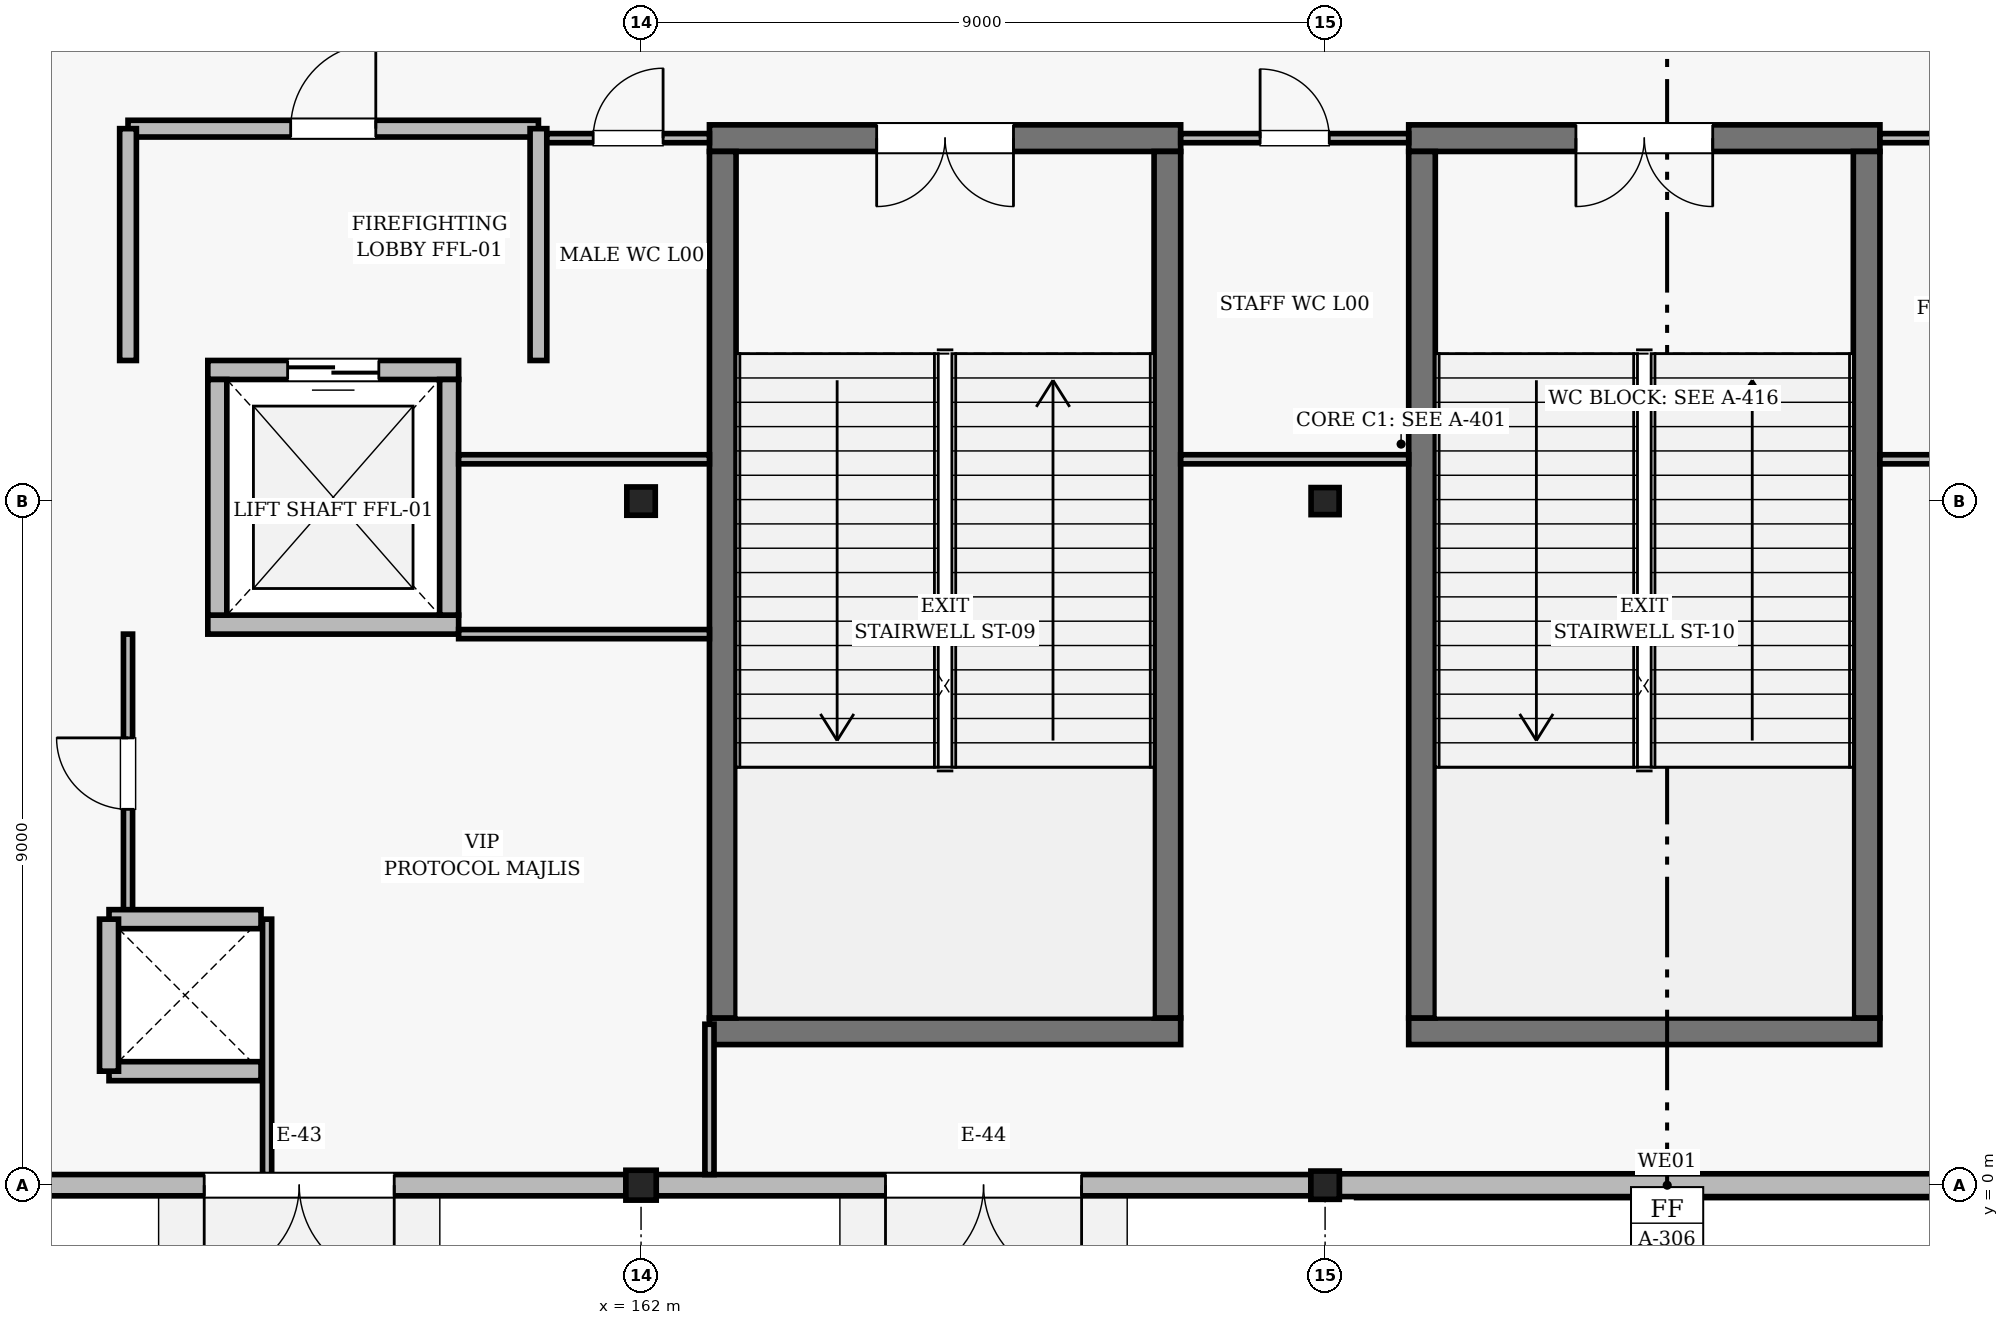
"""IFC4 building model, lengths in metres.
Left out: names, types, materials, properties, quantities, classifications, styles, units other than length and angle.
Written with IfcOpenShell. Run it as: python <this file> out.ifc"""

import sys

from ifc_helpers import new_model, si_unit, direction, frame, frame_2d, origin, origin_2d, place, context, subcontext, project, spatial, rectangle, i_section, extrude, element, fill, save


model = new_model("IFC4")
c1 = context("Model", 3, precision=1e-05, world=origin(), true_north=direction((0.0, 1.0)))
c2 = subcontext(c1, "Body", "Model", "MODEL_VIEW")
j1 = project(units=[si_unit("LENGTHUNIT", "METRE"), si_unit("PLANEANGLEUNIT", "RADIAN")], contexts=[c1])
p1 = place(None, origin())
s1 = spatial("IfcSite", under=j1, at=p1, CompositionType="ELEMENT")
p2 = place(p1, origin())
s2 = spatial("IfcBuilding", under=s1, at=p2, CompositionType="ELEMENT")
p3 = place(p2, origin())
s3 = spatial("IfcBuildingStorey", under=s2, at=p3, CompositionType="ELEMENT", Elevation=0.0)
p4 = place(p3, frame((162.0, 0.0, 0.0), z_axis=(0.0, 0.0, 1.0), x_axis=(1.0, 0.0, 0.0)))
e1 = element("IfcColumn", 1, at=p4, inside=s3, PredefinedType="COLUMN", context=c2, shape_type="SweptSolid", body=[
    extrude(i_section(OverallWidth=0.399, OverallDepth=0.393, WebThickness=0.023, FlangeThickness=0.037, FilletRadius=0.018, at=origin_2d()), origin(), (0.0, 0.0, 1.0), 5.4),
])
for number, where, z_axis, x_axis in (
    (2, (162.0, 9.0, 0.0), (0.0, 0.0, 1.0), (1.0, 0.0, 0.0)),
    (3, (171.0, 0.0, 0.0), (0.0, 0.0, 1.0), (1.0, 0.0, 0.0)),
):
    element("IfcColumn", number, at=place(p3, frame(where, z_axis=z_axis, x_axis=x_axis)), inside=s3, PredefinedType="COLUMN", context=c2, shape_type="SweptSolid", body=[
        extrude(i_section(OverallWidth=0.374, OverallDepth=0.372, WebThickness=0.016, FlangeThickness=0.026, FilletRadius=0.016, at=origin_2d()), origin(), (0.0, 0.0, 1.0), 5.4),
    ])
p5 = place(p3, frame((171.0, 9.0, 0.0), z_axis=(0.0, 0.0, 1.0), x_axis=(1.0, 0.0, 0.0)))
e4 = element("IfcColumn", 4, at=p5, inside=s3, PredefinedType="COLUMN", context=c2, shape_type="SweptSolid", body=[
    extrude(i_section(OverallWidth=0.369, OverallDepth=0.356, WebThickness=0.011, FlangeThickness=0.018, FilletRadius=0.015, at=origin_2d()), origin(), (0.0, 0.0, 1.0), 5.4),
])
p6 = place(p3, frame((161.801, 0.0, 0.0), z_axis=(0.0, 0.0, 1.0), x_axis=(-1.0, 0.0, 0.0)))
e5 = element("IfcWall", 5, at=p6, inside=s3, PredefinedType="SOLIDWALL", context=c2, shape_type="SweptSolid", body=[
    extrude(rectangle(XDim=8.596, YDim=0.28, at=frame_2d((4.298, 0.0))), origin(), (0.0, 0.0, 1.0), 4.699),
])
p7 = place(p6, frame((3.048, 0.0, 0.0)))
e6 = element("IfcOpeningElement", 6, at=p7, cuts=e5, PredefinedType="OPENING", context=c2, shape_type="SweptSolid", body=[
    extrude(rectangle(XDim=2.5, YDim=2.45, at=frame_2d((1.25, 1.225))), frame((0.0, 0.15, 0.0), z_axis=(0.0, -1.0, 0.0), x_axis=(1.0, 0.0, 0.0)), (0.0, 0.0, 1.0), 0.3),
])
p8 = place(p3, frame((170.813, 0.0, 0.0), z_axis=(0.0, 0.0, 1.0), x_axis=(-1.0, 0.0, 0.0)))
e7 = element("IfcWall", 7, at=p8, inside=s3, PredefinedType="SOLIDWALL", context=c2, shape_type="SweptSolid", body=[
    extrude(rectangle(XDim=8.614, YDim=0.28, at=frame_2d((4.307, 0.0))), origin(), (0.0, 0.0, 1.0), 4.865),
])
p9 = place(p8, frame((3.017, 0.0, 0.0)))
e8 = element("IfcOpeningElement", 8, at=p9, cuts=e7, PredefinedType="OPENING", context=c2, shape_type="SweptSolid", body=[
    extrude(rectangle(XDim=2.58, YDim=2.48, at=frame_2d((1.29, 1.24))), frame((0.0, 0.15, 0.0), z_axis=(0.0, -1.0, 0.0), x_axis=(1.0, 0.0, 0.0)), (0.0, 0.0, 1.0), 0.3),
])
p10 = place(p3, frame((179.815, 0.0, 0.0), z_axis=(0.0, 0.0, 1.0), x_axis=(-1.0, 0.0, 0.0)))
e9 = element("IfcWall", 9, at=p10, inside=s3, PredefinedType="SOLIDWALL", context=c2, shape_type="SweptSolid", body=[
    extrude(rectangle(XDim=8.628, YDim=0.3, at=frame_2d((4.314, 0.0))), origin(), (0.0, 0.0, 1.0), 4.626),
])
p11 = place(p3, frame((162.9, 2.025, 0.0), z_axis=(0.0, 0.0, 1.0), x_axis=(1.0, 0.0, 0.0)))
e10 = element("IfcWall", 10, at=p11, inside=s3, PredefinedType="SHEAR", context=c2, shape_type="SweptSolid", body=[
    extrude(rectangle(XDim=6.2, YDim=0.35, at=frame_2d((3.1, 0.0))), origin(), (0.0, 0.0, 1.0), 5.18),
])
p12 = place(p3, frame((169.1, 13.775, 0.0), z_axis=(0.0, 0.0, 1.0), x_axis=(-1.0, 0.0, 0.0)))
e11 = element("IfcWall", 11, at=p12, inside=s3, PredefinedType="SHEAR", context=c2, shape_type="SweptSolid", body=[
    extrude(rectangle(XDim=6.2, YDim=0.35, at=frame_2d((3.1, 0.0))), origin(), (0.0, 0.0, 1.0), 5.18),
])
p13 = place(p12, frame((2.2, 0.0, 0.0)))
e12 = element("IfcOpeningElement", 12, at=p13, cuts=e11, PredefinedType="OPENING", context=c2, shape_type="SweptSolid", body=[
    extrude(rectangle(XDim=1.8, YDim=2.2, at=frame_2d((0.9, 1.1))), frame((0.0, 0.185, 0.0), z_axis=(0.0, -1.0, 0.0), x_axis=(1.0, 0.0, 0.0)), (0.0, 0.0, 1.0), 0.37),
])
for number, where, z_axis, x_axis in (
    (13, (163.075, 13.6, 0.0), (0.0, 0.0, 1.0), (0.0, -1.0, 0.0)),
    (14, (168.925, 2.2, 0.0), (0.0, 0.0, 1.0), (0.0, 1.0, 0.0)),
):
    element("IfcWall", number, at=place(p3, frame(where, z_axis=z_axis, x_axis=x_axis)), inside=s3, PredefinedType="SHEAR", context=c2, shape_type="SweptSolid", body=[
        extrude(rectangle(XDim=11.4, YDim=0.35, at=frame_2d((5.7, 0.0))), origin(), (0.0, 0.0, 1.0), 5.18),
    ])
p14 = place(p3, frame((172.1, 2.025, 0.0), z_axis=(0.0, 0.0, 1.0), x_axis=(1.0, 0.0, 0.0)))
e15 = element("IfcWall", 15, at=p14, inside=s3, PredefinedType="SHEAR", context=c2, shape_type="SweptSolid", body=[
    extrude(rectangle(XDim=6.2, YDim=0.35, at=frame_2d((3.1, 0.0))), origin(), (0.0, 0.0, 1.0), 5.18),
])
p15 = place(p3, frame((178.3, 13.775, 0.0), z_axis=(0.0, 0.0, 1.0), x_axis=(-1.0, 0.0, 0.0)))
e16 = element("IfcWall", 16, at=p15, inside=s3, PredefinedType="SHEAR", context=c2, shape_type="SweptSolid", body=[
    extrude(rectangle(XDim=6.2, YDim=0.35, at=frame_2d((3.1, 0.0))), origin(), (0.0, 0.0, 1.0), 5.18),
])
p16 = place(p15, frame((2.2, 0.0, 0.0)))
e17 = element("IfcOpeningElement", 17, at=p16, cuts=e16, PredefinedType="OPENING", context=c2, shape_type="SweptSolid", body=[
    extrude(rectangle(XDim=1.8, YDim=2.2, at=frame_2d((0.9, 1.1))), frame((0.0, 0.185, 0.0), z_axis=(0.0, -1.0, 0.0), x_axis=(1.0, 0.0, 0.0)), (0.0, 0.0, 1.0), 0.37),
])
for number, where, z_axis, x_axis in (
    (18, (172.275, 13.6, 0.0), (0.0, 0.0, 1.0), (0.0, -1.0, 0.0)),
    (19, (178.125, 2.2, 0.0), (0.0, 0.0, 1.0), (0.0, 1.0, 0.0)),
):
    element("IfcWall", number, at=place(p3, frame(where, z_axis=z_axis, x_axis=x_axis)), inside=s3, PredefinedType="SHEAR", context=c2, shape_type="SweptSolid", body=[
        extrude(rectangle(XDim=11.4, YDim=0.35, at=frame_2d((5.7, 0.0))), origin(), (0.0, 0.0, 1.0), 5.18),
    ])
p17 = place(p3, frame((156.3, 7.375, 0.0), z_axis=(0.0, 0.0, 1.0), x_axis=(1.0, 0.0, 0.0)))
e20 = element("IfcWall", 20, at=p17, inside=s3, PredefinedType="SOLIDWALL", context=c2, shape_type="SweptSolid", body=[
    extrude(rectangle(XDim=3.3, YDim=0.25, at=frame_2d((1.65, 0.0))), origin(), (0.0, 0.0, 1.0), 5.18),
])
p18 = place(p3, frame((159.6, 10.725, 0.0), z_axis=(0.0, 0.0, 1.0), x_axis=(-1.0, 0.0, 0.0)))
e21 = element("IfcWall", 21, at=p18, inside=s3, PredefinedType="SOLIDWALL", context=c2, shape_type="SweptSolid", body=[
    extrude(rectangle(XDim=3.3, YDim=0.25, at=frame_2d((1.65, 0.0))), origin(), (0.0, 0.0, 1.0), 5.18),
])
p19 = place(p18, frame((1.05, 0.0, 0.0)))
e22 = element("IfcOpeningElement", 22, at=p19, cuts=e21, PredefinedType="OPENING", context=c2, shape_type="SweptSolid", body=[
    extrude(rectangle(XDim=1.2, YDim=2.25, at=frame_2d((0.6, 1.125))), frame((0.0, 0.135, 0.0), z_axis=(0.0, -1.0, 0.0), x_axis=(1.0, 0.0, 0.0)), (0.0, 0.0, 1.0), 0.27),
])
for number, where, z_axis, x_axis in (
    (23, (156.425, 10.6, 0.0), (0.0, 0.0, 1.0), (0.0, -1.0, 0.0)),
    (24, (159.475, 7.5, 0.0), (0.0, 0.0, 1.0), (0.0, 1.0, 0.0)),
):
    element("IfcWall", number, at=place(p3, frame(where, z_axis=z_axis, x_axis=x_axis)), inside=s3, PredefinedType="SOLIDWALL", context=c2, shape_type="SweptSolid", body=[
        extrude(rectangle(XDim=3.1, YDim=0.25, at=frame_2d((1.55, 0.0))), origin(), (0.0, 0.0, 1.0), 5.18),
    ])
p20 = place(p3, frame((155.25, 13.9, 0.0), z_axis=(0.0, 0.0, 1.0), x_axis=(1.0, 0.0, 0.0)))
e25 = element("IfcWall", 25, at=p20, inside=s3, PredefinedType="SOLIDWALL", context=c2, shape_type="SweptSolid", body=[
    extrude(rectangle(XDim=5.4, YDim=0.22, at=frame_2d((2.7, 0.0))), origin(), (0.0, 0.0, 1.0), 5.18),
])
p21 = place(p20, frame((2.14, 0.0, 0.0)))
e26 = element("IfcOpeningElement", 26, at=p21, cuts=e25, PredefinedType="OPENING", context=c2, shape_type="SweptSolid", body=[
    extrude(rectangle(XDim=1.12, YDim=2.2, at=frame_2d((0.56, 1.1))), frame((0.0, 0.12, 0.0), z_axis=(0.0, -1.0, 0.0), x_axis=(1.0, 0.0, 0.0)), (0.0, 0.0, 1.0), 0.24),
])
for number, where, z_axis, x_axis in (
    (27, (155.25, 10.85, 0.0), (0.0, 0.0, 1.0), (0.0, 1.0, 0.0)),
    (28, (160.65, 10.85, 0.0), (0.0, 0.0, 1.0), (0.0, 1.0, 0.0)),
):
    element("IfcWall", number, at=place(p3, frame(where, z_axis=z_axis, x_axis=x_axis)), inside=s3, PredefinedType="SOLIDWALL", context=c2, shape_type="SweptSolid", body=[
        extrude(rectangle(XDim=3.05, YDim=0.22, at=frame_2d((1.525, 0.0))), origin(), (0.0, 0.0, 1.0), 5.18),
    ])
p22 = place(p3, frame((160.76, 13.775, 0.0), z_axis=(0.0, 0.0, 1.0), x_axis=(1.0, 0.0, 0.0)))
e29 = element("IfcWall", 29, at=p22, inside=s3, PredefinedType="PARTITIONING", context=c2, shape_type="SweptSolid", body=[
    extrude(rectangle(XDim=2.14, YDim=0.12, at=frame_2d((1.07, 0.0))), origin(), (0.0, 0.0, 1.0), 4.47),
])
p23 = place(p22, frame((0.61, 0.0, 0.0)))
e30 = element("IfcOpeningElement", 30, at=p23, cuts=e29, PredefinedType="OPENING", context=c2, shape_type="SweptSolid", body=[
    extrude(rectangle(XDim=0.92, YDim=2.12, at=frame_2d((0.46, 1.06))), frame((0.0, 0.07, 0.0), z_axis=(0.0, -1.0, 0.0), x_axis=(1.0, 0.0, 0.0)), (0.0, 0.0, 1.0), 0.14),
])
p24 = place(p3, frame((162.9, 9.55, 0.0), z_axis=(0.0, 0.0, 1.0), x_axis=(-1.0, 0.0, 0.0)))
e31 = element("IfcWall", 31, at=p24, inside=s3, PredefinedType="PARTITIONING", context=c2, shape_type="SweptSolid", body=[
    extrude(rectangle(XDim=3.3, YDim=0.12, at=frame_2d((1.65, 0.0))), origin(), (0.0, 0.0, 1.0), 4.47),
])
p25 = place(p3, frame((169.1, 13.775, 0.0), z_axis=(0.0, 0.0, 1.0), x_axis=(1.0, 0.0, 0.0)))
e32 = element("IfcWall", 32, at=p25, inside=s3, PredefinedType="PARTITIONING", context=c2, shape_type="SweptSolid", body=[
    extrude(rectangle(XDim=3.0, YDim=0.12, at=frame_2d((1.5, 0.0))), origin(), (0.0, 0.0, 1.0), 4.554),
])
p26 = place(p25, frame((1.045, 0.0, 0.0)))
e33 = element("IfcOpeningElement", 33, at=p26, cuts=e32, PredefinedType="OPENING", context=c2, shape_type="SweptSolid", body=[
    extrude(rectangle(XDim=0.91, YDim=2.12, at=frame_2d((0.455, 1.06))), frame((0.0, 0.07, 0.0), z_axis=(0.0, -1.0, 0.0), x_axis=(1.0, 0.0, 0.0)), (0.0, 0.0, 1.0), 0.14),
])
p27 = place(p3, frame((172.1, 9.55, 0.0), z_axis=(0.0, 0.0, 1.0), x_axis=(-1.0, 0.0, 0.0)))
e34 = element("IfcWall", 34, at=p27, inside=s3, PredefinedType="PARTITIONING", context=c2, shape_type="SweptSolid", body=[
    extrude(rectangle(XDim=3.0, YDim=0.12, at=frame_2d((1.5, 0.0))), origin(), (0.0, 0.0, 1.0), 4.554),
])
p28 = place(p3, frame((178.3, 13.775, 0.0), z_axis=(0.0, 0.0, 1.0), x_axis=(1.0, 0.0, 0.0)))
e35 = element("IfcWall", 35, at=p28, inside=s3, PredefinedType="PARTITIONING", context=c2, shape_type="SweptSolid", body=[
    extrude(rectangle(XDim=3.39, YDim=0.12, at=frame_2d((1.695, 0.0))), origin(), (0.0, 0.0, 1.0), 4.392),
])
p29 = place(p28, frame((1.235, 0.0, 0.0)))
e36 = element("IfcOpeningElement", 36, at=p29, cuts=e35, PredefinedType="OPENING", context=c2, shape_type="SweptSolid", body=[
    extrude(rectangle(XDim=0.92, YDim=2.12, at=frame_2d((0.46, 1.06))), frame((0.0, 0.07, 0.0), z_axis=(0.0, -1.0, 0.0), x_axis=(1.0, 0.0, 0.0)), (0.0, 0.0, 1.0), 0.14),
])
p30 = place(p3, frame((182.85, 9.55, 0.0), z_axis=(0.0, 0.0, 1.0), x_axis=(-1.0, 0.0, 0.0)))
e37 = element("IfcWall", 37, at=p30, inside=s3, PredefinedType="PARTITIONING", context=c2, shape_type="SweptSolid", body=[
    extrude(rectangle(XDim=4.55, YDim=0.12, at=frame_2d((2.275, 0.0))), origin(), (0.0, 0.0, 1.0), 4.392),
])
p31 = place(p3, frame((159.6, 7.25, 0.0), z_axis=(0.0, 0.0, 1.0), x_axis=(1.0, 0.0, 0.0)))
e38 = element("IfcWall", 38, at=p31, inside=s3, PredefinedType="PARTITIONING", context=c2, shape_type="SweptSolid", body=[
    extrude(rectangle(XDim=3.3, YDim=0.12, at=frame_2d((1.65, 0.0))), origin(), (0.0, 0.0, 1.0), 4.392),
])
p32 = place(p3, frame((162.9, 2.117, 0.0), z_axis=(0.0, 0.0, 1.0), x_axis=(0.0, -1.0, 0.0)))
e39 = element("IfcWall", 39, at=p32, inside=s3, PredefinedType="PARTITIONING", context=c2, shape_type="SweptSolid", body=[
    extrude(rectangle(XDim=1.978, YDim=0.12, at=frame_2d((0.989, 0.0))), origin(), (0.0, 0.0, 1.0), 4.865),
])
p33 = place(p3, frame((157.08, 0.14, 0.0), z_axis=(0.0, 0.0, 1.0), x_axis=(0.0, 1.0, 0.0)))
e40 = element("IfcWall", 40, at=p33, inside=s3, PredefinedType="PARTITIONING", context=c2, shape_type="SweptSolid", body=[
    extrude(rectangle(XDim=3.36, YDim=0.12, at=frame_2d((1.68, 0.0))), origin(), (0.0, 0.0, 1.0), 4.699),
])
p34 = place(p3, frame((155.25, 3.58, 0.0), z_axis=(0.0, 0.0, 1.0), x_axis=(0.0, 1.0, 0.0)))
e41 = element("IfcWall", 41, at=p34, inside=s3, PredefinedType="PARTITIONING", context=c2, shape_type="SweptSolid", body=[
    extrude(rectangle(XDim=3.67, YDim=0.12, at=frame_2d((1.835, 0.0))), origin(), (0.0, 0.0, 1.0), 5.18),
])
p35 = place(p34, frame((1.365, 0.0, 0.0)))
e42 = element("IfcOpeningElement", 42, at=p35, cuts=e41, PredefinedType="OPENING", context=c2, shape_type="SweptSolid", body=[
    extrude(rectangle(XDim=0.94, YDim=2.15, at=frame_2d((0.47, 1.075))), frame((0.0, 0.07, 0.0), z_axis=(0.0, -1.0, 0.0), x_axis=(1.0, 0.0, 0.0)), (0.0, 0.0, 1.0), 0.14),
])
for number, where, z_axis, x_axis in (
    (43, (155.0, 1.5, 0.0), (0.0, 0.0, 1.0), (1.0, 0.0, 0.0)),
    (44, (157.0, 3.5, 0.0), (0.0, 0.0, 1.0), (-1.0, 0.0, 0.0)),
    (45, (155.0, 3.5, 0.0), (0.0, 0.0, 1.0), (0.0, -1.0, 0.0)),
):
    element("IfcWall", number, at=place(p3, frame(where, z_axis=z_axis, x_axis=x_axis)), inside=s3, PredefinedType="SOLIDWALL", context=c2, shape_type="SweptSolid", body=[
        extrude(rectangle(XDim=2.0, YDim=0.25, at=frame_2d((1.0, 0.0))), origin(), (0.0, 0.0, 1.0), 4.83),
    ])
p36 = place(p7, origin())
e46 = element("IfcDoor", 46, at=p36, inside=s3, OperationType="DOUBLE_DOOR_SINGLE_SWING", PredefinedType="DOOR", context=c2, shape_type="SweptSolid", body=[
    extrude(rectangle(XDim=2.5, YDim=2.45, at=frame_2d((1.25, 1.225))), frame((0.0, 0.025, 0.0), z_axis=(0.0, -1.0, 0.0), x_axis=(1.0, 0.0, 0.0)), (0.0, 0.0, 1.0), 0.05),
])
fill(e6, e46)
p37 = place(p9, origin())
e47 = element("IfcDoor", 47, at=p37, inside=s3, OperationType="DOUBLE_DOOR_SINGLE_SWING", PredefinedType="DOOR", context=c2, shape_type="SweptSolid", body=[
    extrude(rectangle(XDim=2.58, YDim=2.48, at=frame_2d((1.29, 1.24))), frame((0.0, 0.025, 0.0), z_axis=(0.0, -1.0, 0.0), x_axis=(1.0, 0.0, 0.0)), (0.0, 0.0, 1.0), 0.05),
])
fill(e8, e47)
p38 = place(p13, origin())
e48 = element("IfcDoor", 48, at=p38, inside=s3, OperationType="DOUBLE_DOOR_SINGLE_SWING", PredefinedType="DOOR", context=c2, shape_type="SweptSolid", body=[
    extrude(rectangle(XDim=1.8, YDim=2.2, at=frame_2d((0.9, 1.1))), frame((0.0, 0.025, 0.0), z_axis=(0.0, -1.0, 0.0), x_axis=(1.0, 0.0, 0.0)), (0.0, 0.0, 1.0), 0.05),
])
fill(e12, e48)
p39 = place(p16, origin())
e49 = element("IfcDoor", 49, at=p39, inside=s3, OperationType="DOUBLE_DOOR_SINGLE_SWING", PredefinedType="DOOR", context=c2, shape_type="SweptSolid", body=[
    extrude(rectangle(XDim=1.8, YDim=2.2, at=frame_2d((0.9, 1.1))), frame((0.0, 0.025, 0.0), z_axis=(0.0, -1.0, 0.0), x_axis=(1.0, 0.0, 0.0)), (0.0, 0.0, 1.0), 0.05),
])
fill(e17, e49)
p40 = place(p19, origin())
e50 = element("IfcDoor", 50, at=p40, inside=s3, OperationType="DOUBLE_DOOR_SLIDING", PredefinedType="DOOR", context=c2, shape_type="SweptSolid", body=[
    extrude(rectangle(XDim=1.2, YDim=2.25, at=frame_2d((0.6, 1.125))), frame((0.0, 0.025, 0.0), z_axis=(0.0, -1.0, 0.0), x_axis=(1.0, 0.0, 0.0)), (0.0, 0.0, 1.0), 0.05),
])
fill(e22, e50)
p41 = place(p21, origin())
e51 = element("IfcDoor", 51, at=p41, inside=s3, OperationType="SINGLE_SWING_RIGHT", PredefinedType="DOOR", context=c2, shape_type="SweptSolid", body=[
    extrude(rectangle(XDim=1.12, YDim=2.2, at=frame_2d((0.56, 1.1))), frame((0.0, 0.025, 0.0), z_axis=(0.0, -1.0, 0.0), x_axis=(1.0, 0.0, 0.0)), (0.0, 0.0, 1.0), 0.05),
])
fill(e26, e51)
p42 = place(p23, origin())
e52 = element("IfcDoor", 52, at=p42, inside=s3, OperationType="SINGLE_SWING_RIGHT", PredefinedType="DOOR", context=c2, shape_type="SweptSolid", body=[
    extrude(rectangle(XDim=0.92, YDim=2.12, at=frame_2d((0.46, 1.06))), frame((0.0, 0.025, 0.0), z_axis=(0.0, -1.0, 0.0), x_axis=(1.0, 0.0, 0.0)), (0.0, 0.0, 1.0), 0.05),
])
fill(e30, e52)
p43 = place(p26, origin())
e53 = element("IfcDoor", 53, at=p43, inside=s3, OperationType="SINGLE_SWING_LEFT", PredefinedType="DOOR", context=c2, shape_type="SweptSolid", body=[
    extrude(rectangle(XDim=0.91, YDim=2.12, at=frame_2d((0.455, 1.06))), frame((0.0, 0.025, 0.0), z_axis=(0.0, -1.0, 0.0), x_axis=(1.0, 0.0, 0.0)), (0.0, 0.0, 1.0), 0.05),
])
fill(e33, e53)
p44 = place(p35, origin())
e54 = element("IfcDoor", 54, at=p44, inside=s3, OperationType="SINGLE_SWING_RIGHT", PredefinedType="DOOR", context=c2, shape_type="SweptSolid", body=[
    extrude(rectangle(XDim=0.94, YDim=2.15, at=frame_2d((0.47, 1.075))), frame((0.0, 0.025, 0.0), z_axis=(0.0, -1.0, 0.0), x_axis=(1.0, 0.0, 0.0)), (0.0, 0.0, 1.0), 0.05),
])
fill(e42, e54)
save(model, sys.argv[1])
